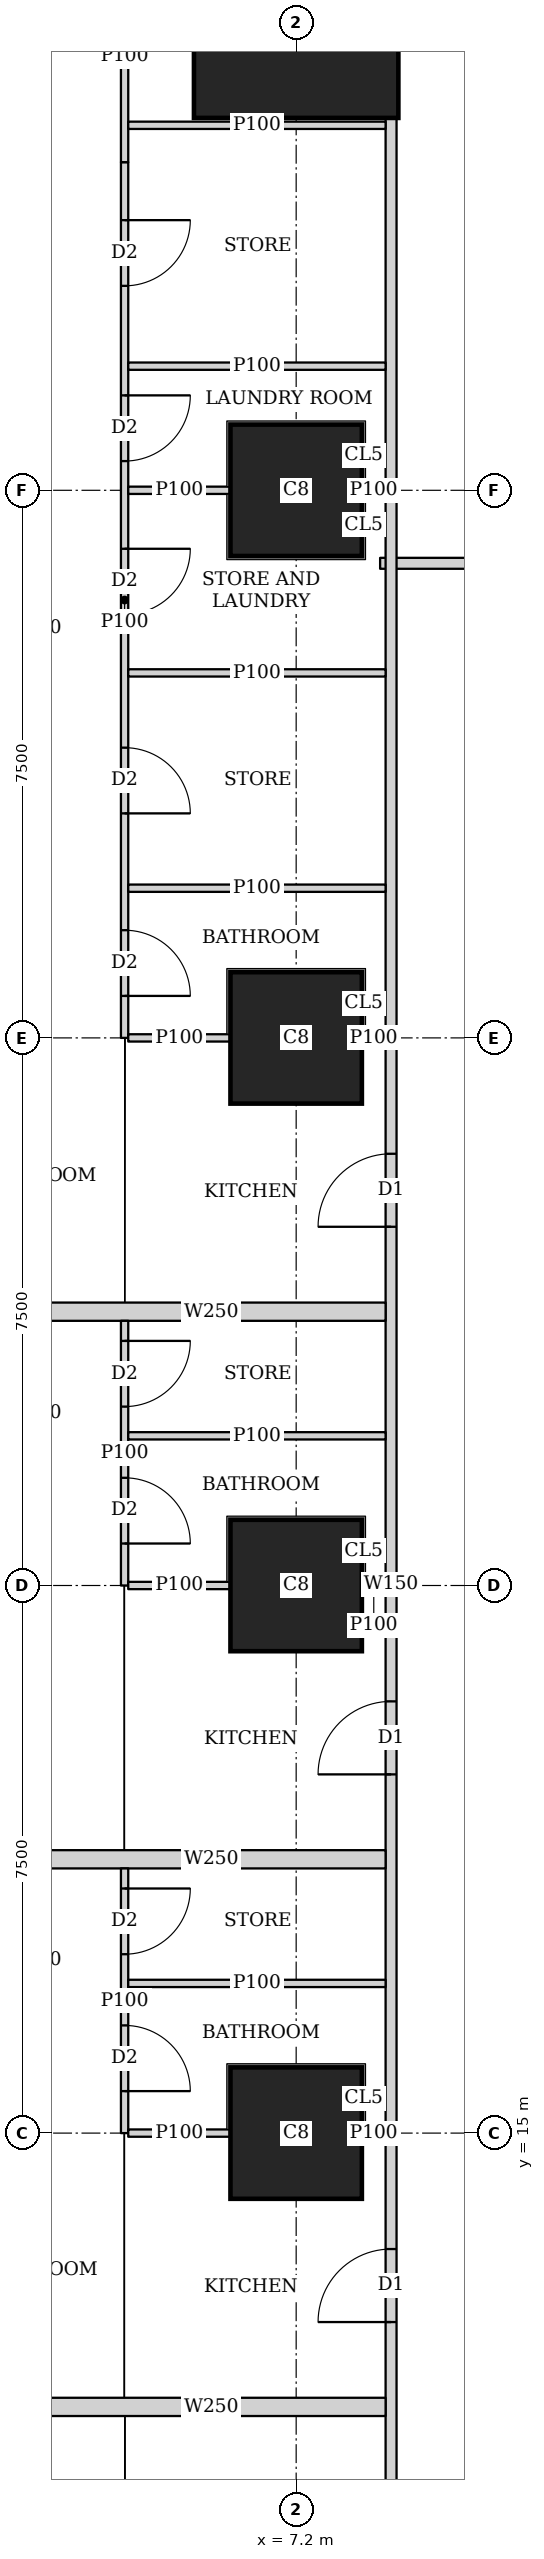
"""IFC4 building model, lengths in metres.
Left out: names, types, materials, properties, quantities, classifications, styles, units other than length and angle.
Written with IfcOpenShell. Run it as: python <this file> out.ifc"""

import sys

from ifc_helpers import new_model, si_unit, direction, frame, frame_2d, origin, origin_2d, place, context, subcontext, project, spatial, rectangle, extrude, element, fill, save


model = new_model("IFC4")
c1 = context("Model", 3, precision=1e-05, world=origin(), true_north=direction((0.0, 1.0)))
c2 = subcontext(c1, "Body", "Model", "MODEL_VIEW")
j1 = project(units=[si_unit("LENGTHUNIT", "METRE"), si_unit("PLANEANGLEUNIT", "RADIAN")], contexts=[c1])
p1 = place(None, origin())
s1 = spatial("IfcSite", under=j1, at=p1, CompositionType="ELEMENT")
p2 = place(p1, origin())
s2 = spatial("IfcBuilding", under=s1, at=p2, CompositionType="ELEMENT")
p3 = place(p2, frame((0.0, 0.0, 68.75)))
s3 = spatial("IfcBuildingStorey", under=s2, at=p3, CompositionType="ELEMENT", Elevation=68.75)
for number, where, z_axis, x_axis in (
    (1, (7.2, 15.0, 0.0), (0.0, 0.0, 1.0), (1.0, 0.0, 0.0)),
    (2, (7.2, 22.5, 0.0), (0.0, 0.0, 1.0), (1.0, 0.0, 0.0)),
    (3, (7.2, 30.0, 0.0), (0.0, 0.0, 1.0), (1.0, 0.0, 0.0)),
    (4, (7.2, 37.5, 0.0), (0.0, 0.0, 1.0), (1.0, 0.0, 0.0)),
):
    element("IfcColumn", number, at=place(p3, frame(where, z_axis=z_axis, x_axis=x_axis)), inside=s3, PredefinedType="COLUMN", context=c2, shape_type="SweptSolid", body=[
        extrude(rectangle(XDim=1.8, YDim=1.8, at=origin_2d()), origin(), (0.0, 0.0, 1.0), 3.75),
    ])
p4 = place(p3, frame((7.2, 44.0, 0.0), z_axis=(0.0, 0.0, 1.0), x_axis=(1.0, 0.0, 0.0)))
e5 = element("IfcColumn", 5, at=p4, inside=s3, PredefinedType="COLUMN", context=c2, shape_type="SweptSolid", body=[
    extrude(rectangle(XDim=2.8, YDim=2.8, at=origin_2d()), origin(), (0.0, 0.0, 1.0), 3.75),
])
p5 = place(p3, frame((8.5, 2.426, 0.0), z_axis=(0.0, 0.0, 1.0), x_axis=(0.0, 1.0, 0.0)))
e6 = element("IfcWall", 6, at=p5, inside=s3, PredefinedType="SOLIDWALL", context=c2, shape_type="SweptSolid", body=[
    extrude(rectangle(XDim=40.173, YDim=0.15, at=frame_2d((20.086, 0.0))), origin(), (0.0, 0.0, 1.0), 3.45),
])
p6 = place(p5, frame((6.661, 0.0, 0.0)))
e7 = element("IfcOpeningElement", 7, at=p6, cuts=e6, PredefinedType="OPENING", context=c2, shape_type="SweptSolid", body=[
    extrude(rectangle(XDim=1.0, YDim=2.1, at=frame_2d((0.5, 1.05))), frame((0.0, 0.085, 0.0), z_axis=(0.0, -1.0, 0.0), x_axis=(1.0, 0.0, 0.0)), (0.0, 0.0, 1.0), 0.17),
])
p7 = place(p5, frame((9.986, 0.0, 0.0)))
e8 = element("IfcOpeningElement", 8, at=p7, cuts=e6, PredefinedType="OPENING", context=c2, shape_type="SweptSolid", body=[
    extrude(rectangle(XDim=1.0, YDim=2.1, at=frame_2d((0.5, 1.05))), frame((0.0, 0.085, 0.0), z_axis=(0.0, -1.0, 0.0), x_axis=(1.0, 0.0, 0.0)), (0.0, 0.0, 1.0), 0.17),
])
p8 = place(p5, frame((17.487, 0.0, 0.0)))
e9 = element("IfcOpeningElement", 9, at=p8, cuts=e6, PredefinedType="OPENING", context=c2, shape_type="SweptSolid", body=[
    extrude(rectangle(XDim=1.0, YDim=2.1, at=frame_2d((0.5, 1.05))), frame((0.0, 0.085, 0.0), z_axis=(0.0, -1.0, 0.0), x_axis=(1.0, 0.0, 0.0)), (0.0, 0.0, 1.0), 0.17),
])
p9 = place(p5, frame((24.987, 0.0, 0.0)))
e10 = element("IfcOpeningElement", 10, at=p9, cuts=e6, PredefinedType="OPENING", context=c2, shape_type="SweptSolid", body=[
    extrude(rectangle(XDim=1.0, YDim=2.1, at=frame_2d((0.5, 1.05))), frame((0.0, 0.085, 0.0), z_axis=(0.0, -1.0, 0.0), x_axis=(1.0, 0.0, 0.0)), (0.0, 0.0, 1.0), 0.17),
])
p10 = place(p3, frame((8.35, 36.5, 0.0), z_axis=(0.0, 0.0, 1.0), x_axis=(1.0, 0.0, 0.0)))
e11 = element("IfcWall", 11, at=p10, inside=s3, PredefinedType="SOLIDWALL", context=c2, shape_type="SweptSolid", body=[
    extrude(rectangle(XDim=26.415, YDim=0.15, at=frame_2d((13.208, 0.0))), origin(), (0.0, 0.0, 1.0), 3.45),
])
p11 = place(p10, frame((2.6, 0.0, 0.0)))
e12 = element("IfcOpeningElement", 12, at=p11, cuts=e11, PredefinedType="OPENING", context=c2, shape_type="SweptSolid", body=[
    extrude(rectangle(XDim=1.0, YDim=2.1, at=frame_2d((0.5, 1.05))), frame((0.0, 0.085, 0.0), z_axis=(0.0, -1.0, 0.0), x_axis=(1.0, 0.0, 0.0)), (0.0, 0.0, 1.0), 0.17),
])
p12 = place(p10, frame((10.949, 0.0, 0.0)))
e13 = element("IfcOpeningElement", 13, at=p12, cuts=e11, PredefinedType="OPENING", context=c2, shape_type="SweptSolid", body=[
    extrude(rectangle(XDim=1.0, YDim=2.1, at=frame_2d((0.5, 1.05))), frame((0.0, 0.085, 0.0), z_axis=(0.0, -1.0, 0.0), x_axis=(1.0, 0.0, 0.0)), (0.0, 0.0, 1.0), 0.17),
])
p13 = place(p10, frame((18.149, 0.0, 0.0)))
e14 = element("IfcOpeningElement", 14, at=p13, cuts=e11, PredefinedType="OPENING", context=c2, shape_type="SweptSolid", body=[
    extrude(rectangle(XDim=1.0, YDim=2.1, at=frame_2d((0.5, 1.05))), frame((0.0, 0.085, 0.0), z_axis=(0.0, -1.0, 0.0), x_axis=(1.0, 0.0, 0.0)), (0.0, 0.0, 1.0), 0.17),
])
p14 = place(p3, frame((4.85, 15.0, 0.0), z_axis=(0.0, 0.0, 1.0), x_axis=(0.0, 1.0, 0.0)))
e15 = element("IfcWall", 15, at=p14, inside=s3, PredefinedType="PARTITIONING", context=c2, shape_type="SweptSolid", body=[
    extrude(rectangle(XDim=3.625, YDim=0.1, at=frame_2d((1.812, 0.0))), origin(), (0.0, 0.0, 1.0), 3.45),
])
p15 = place(p14, frame((0.575, 0.0, 0.0)))
e16 = element("IfcOpeningElement", 16, at=p15, cuts=e15, PredefinedType="OPENING", context=c2, shape_type="SweptSolid", body=[
    extrude(rectangle(XDim=0.9, YDim=2.1, at=frame_2d((0.45, 1.05))), frame((0.0, 0.06, 0.0), z_axis=(0.0, -1.0, 0.0), x_axis=(1.0, 0.0, 0.0)), (0.0, 0.0, 1.0), 0.12),
])
p16 = place(p14, frame((2.45, 0.0, 0.0)))
e17 = element("IfcOpeningElement", 17, at=p16, cuts=e15, PredefinedType="OPENING", context=c2, shape_type="SweptSolid", body=[
    extrude(rectangle(XDim=0.9, YDim=2.1, at=frame_2d((0.45, 1.05))), frame((0.0, 0.06, 0.0), z_axis=(0.0, -1.0, 0.0), x_axis=(1.0, 0.0, 0.0)), (0.0, 0.0, 1.0), 0.12),
])
p17 = place(p3, frame((4.9, 15.0, 0.0), z_axis=(0.0, 0.0, 1.0), x_axis=(1.0, 0.0, 0.0)))
e18 = element("IfcWall", 18, at=p17, inside=s3, PredefinedType="PARTITIONING", context=c2, shape_type="SweptSolid", body=[
    extrude(rectangle(XDim=1.399, YDim=0.1, at=frame_2d((0.7, 0.0))), origin(), (0.0, 0.0, 1.0), 3.45),
])
p18 = place(p3, frame((8.101, 15.0, 0.0), z_axis=(0.0, 0.0, 1.0), x_axis=(1.0, 0.0, 0.0)))
e19 = element("IfcWall", 19, at=p18, inside=s3, PredefinedType="PARTITIONING", context=c2, shape_type="SweptSolid", body=[
    extrude(rectangle(XDim=0.324, YDim=0.1, at=frame_2d((0.162, 0.0))), origin(), (0.0, 0.0, 1.0), 3.45),
])
p19 = place(p3, frame((4.9, 17.05, 0.0), z_axis=(0.0, 0.0, 1.0), x_axis=(1.0, 0.0, 0.0)))
e20 = element("IfcWall", 20, at=p19, inside=s3, PredefinedType="PARTITIONING", context=c2, shape_type="SweptSolid", body=[
    extrude(rectangle(XDim=3.525, YDim=0.1, at=frame_2d((1.763, 0.0))), origin(), (0.0, 0.0, 1.0), 3.45),
])
p20 = place(p3, frame((3.65, 11.25, 0.0), z_axis=(0.0, 0.0, 1.0), x_axis=(1.0, 0.0, 0.0)))
e21 = element("IfcWall", 21, at=p20, inside=s3, PredefinedType="SOLIDWALL", context=c2, shape_type="SweptSolid", body=[
    extrude(rectangle(XDim=4.775, YDim=0.25, at=frame_2d((2.388, 0.0))), origin(), (0.0, 0.0, 1.0), 3.45),
])
p21 = place(p3, frame((4.85, 22.5, 0.0), z_axis=(0.0, 0.0, 1.0), x_axis=(0.0, 1.0, 0.0)))
e22 = element("IfcWall", 22, at=p21, inside=s3, PredefinedType="PARTITIONING", context=c2, shape_type="SweptSolid", body=[
    extrude(rectangle(XDim=3.625, YDim=0.1, at=frame_2d((1.812, 0.0))), origin(), (0.0, 0.0, 1.0), 3.45),
])
p22 = place(p21, frame((0.575, 0.0, 0.0)))
e23 = element("IfcOpeningElement", 23, at=p22, cuts=e22, PredefinedType="OPENING", context=c2, shape_type="SweptSolid", body=[
    extrude(rectangle(XDim=0.9, YDim=2.1, at=frame_2d((0.45, 1.05))), frame((0.0, 0.06, 0.0), z_axis=(0.0, -1.0, 0.0), x_axis=(1.0, 0.0, 0.0)), (0.0, 0.0, 1.0), 0.12),
])
p23 = place(p21, frame((2.45, 0.0, 0.0)))
e24 = element("IfcOpeningElement", 24, at=p23, cuts=e22, PredefinedType="OPENING", context=c2, shape_type="SweptSolid", body=[
    extrude(rectangle(XDim=0.9, YDim=2.1, at=frame_2d((0.45, 1.05))), frame((0.0, 0.06, 0.0), z_axis=(0.0, -1.0, 0.0), x_axis=(1.0, 0.0, 0.0)), (0.0, 0.0, 1.0), 0.12),
])
p24 = place(p3, frame((4.9, 22.5, 0.0), z_axis=(0.0, 0.0, 1.0), x_axis=(1.0, 0.0, 0.0)))
e25 = element("IfcWall", 25, at=p24, inside=s3, PredefinedType="PARTITIONING", context=c2, shape_type="SweptSolid", body=[
    extrude(rectangle(XDim=1.399, YDim=0.1, at=frame_2d((0.7, 0.0))), origin(), (0.0, 0.0, 1.0), 3.45),
])
p25 = place(p3, frame((8.101, 22.5, 0.0), z_axis=(0.0, 0.0, 1.0), x_axis=(1.0, 0.0, 0.0)))
e26 = element("IfcWall", 26, at=p25, inside=s3, PredefinedType="PARTITIONING", context=c2, shape_type="SweptSolid", body=[
    extrude(rectangle(XDim=0.324, YDim=0.1, at=frame_2d((0.162, 0.0))), origin(), (0.0, 0.0, 1.0), 3.45),
])
p26 = place(p3, frame((4.9, 24.55, 0.0), z_axis=(0.0, 0.0, 1.0), x_axis=(1.0, 0.0, 0.0)))
e27 = element("IfcWall", 27, at=p26, inside=s3, PredefinedType="PARTITIONING", context=c2, shape_type="SweptSolid", body=[
    extrude(rectangle(XDim=3.525, YDim=0.1, at=frame_2d((1.763, 0.0))), origin(), (0.0, 0.0, 1.0), 3.45),
])
p27 = place(p3, frame((3.65, 18.75, 0.0), z_axis=(0.0, 0.0, 1.0), x_axis=(1.0, 0.0, 0.0)))
e28 = element("IfcWall", 28, at=p27, inside=s3, PredefinedType="SOLIDWALL", context=c2, shape_type="SweptSolid", body=[
    extrude(rectangle(XDim=4.775, YDim=0.25, at=frame_2d((2.388, 0.0))), origin(), (0.0, 0.0, 1.0), 3.45),
])
p28 = place(p3, frame((4.85, 30.0, 0.0), z_axis=(0.0, 0.0, 1.0), x_axis=(0.0, 1.0, 0.0)))
e29 = element("IfcWall", 29, at=p28, inside=s3, PredefinedType="PARTITIONING", context=c2, shape_type="SweptSolid", body=[
    extrude(rectangle(XDim=11.994, YDim=0.1, at=frame_2d((5.997, 0.0))), origin(), (0.0, 0.0, 1.0), 3.45),
])
p29 = place(p28, frame((0.575, 0.0, 0.0)))
e30 = element("IfcOpeningElement", 30, at=p29, cuts=e29, PredefinedType="OPENING", context=c2, shape_type="SweptSolid", body=[
    extrude(rectangle(XDim=0.9, YDim=2.1, at=frame_2d((0.45, 1.05))), frame((0.0, 0.06, 0.0), z_axis=(0.0, -1.0, 0.0), x_axis=(1.0, 0.0, 0.0)), (0.0, 0.0, 1.0), 0.12),
])
p30 = place(p28, frame((5.799, 0.0, 0.0)))
e31 = element("IfcOpeningElement", 31, at=p30, cuts=e29, PredefinedType="OPENING", context=c2, shape_type="SweptSolid", body=[
    extrude(rectangle(XDim=0.9, YDim=2.1, at=frame_2d((0.45, 1.05))), frame((0.0, 0.06, 0.0), z_axis=(0.0, -1.0, 0.0), x_axis=(1.0, 0.0, 0.0)), (0.0, 0.0, 1.0), 0.12),
])
p31 = place(p28, frame((7.9, 0.0, 0.0)))
e32 = element("IfcOpeningElement", 32, at=p31, cuts=e29, PredefinedType="OPENING", context=c2, shape_type="SweptSolid", body=[
    extrude(rectangle(XDim=0.9, YDim=2.1, at=frame_2d((0.45, 1.05))), frame((0.0, 0.06, 0.0), z_axis=(0.0, -1.0, 0.0), x_axis=(1.0, 0.0, 0.0)), (0.0, 0.0, 1.0), 0.12),
])
p32 = place(p28, frame((3.075, 0.0, 0.0)))
e33 = element("IfcOpeningElement", 33, at=p32, cuts=e29, PredefinedType="OPENING", context=c2, shape_type="SweptSolid", body=[
    extrude(rectangle(XDim=0.9, YDim=2.1, at=frame_2d((0.45, 1.05))), frame((0.0, 0.06, 0.0), z_axis=(0.0, -1.0, 0.0), x_axis=(1.0, 0.0, 0.0)), (0.0, 0.0, 1.0), 0.12),
])
p33 = place(p28, frame((10.3, 0.0, 0.0)))
e34 = element("IfcOpeningElement", 34, at=p33, cuts=e29, PredefinedType="OPENING", context=c2, shape_type="SweptSolid", body=[
    extrude(rectangle(XDim=0.9, YDim=2.1, at=frame_2d((0.45, 1.05))), frame((0.0, 0.06, 0.0), z_axis=(0.0, -1.0, 0.0), x_axis=(1.0, 0.0, 0.0)), (0.0, 0.0, 1.0), 0.12),
])
p34 = place(p3, frame((4.85, 41.994, 0.0), z_axis=(0.0, 0.0, 1.0), x_axis=(0.0, 1.0, 0.0)))
e35 = element("IfcWall", 35, at=p34, inside=s3, PredefinedType="PARTITIONING", context=c2, shape_type="SweptSolid", body=[
    extrude(rectangle(XDim=2.901, YDim=0.1, at=frame_2d((1.451, 0.0))), origin(), (0.0, 0.0, 1.0), 2.0),
])
p35 = place(p3, frame((4.9, 30.0, 0.0), z_axis=(0.0, 0.0, 1.0), x_axis=(1.0, 0.0, 0.0)))
e36 = element("IfcWall", 36, at=p35, inside=s3, PredefinedType="PARTITIONING", context=c2, shape_type="SweptSolid", body=[
    extrude(rectangle(XDim=1.399, YDim=0.1, at=frame_2d((0.7, 0.0))), origin(), (0.0, 0.0, 1.0), 3.45),
])
p36 = place(p3, frame((8.101, 30.0, 0.0), z_axis=(0.0, 0.0, 1.0), x_axis=(1.0, 0.0, 0.0)))
e37 = element("IfcWall", 37, at=p36, inside=s3, PredefinedType="PARTITIONING", context=c2, shape_type="SweptSolid", body=[
    extrude(rectangle(XDim=0.324, YDim=0.1, at=frame_2d((0.162, 0.0))), origin(), (0.0, 0.0, 1.0), 3.45),
])
p37 = place(p3, frame((4.9, 34.999, 0.0), z_axis=(0.0, 0.0, 1.0), x_axis=(1.0, 0.0, 0.0)))
e38 = element("IfcWall", 38, at=p37, inside=s3, PredefinedType="PARTITIONING", context=c2, shape_type="SweptSolid", body=[
    extrude(rectangle(XDim=3.525, YDim=0.1, at=frame_2d((1.763, 0.0))), origin(), (0.0, 0.0, 1.0), 3.45),
])
p38 = place(p3, frame((4.9, 37.5, 0.0), z_axis=(0.0, 0.0, 1.0), x_axis=(1.0, 0.0, 0.0)))
e39 = element("IfcWall", 39, at=p38, inside=s3, PredefinedType="PARTITIONING", context=c2, shape_type="SweptSolid", body=[
    extrude(rectangle(XDim=1.399, YDim=0.1, at=frame_2d((0.7, 0.0))), origin(), (0.0, 0.0, 1.0), 3.45),
])
p39 = place(p3, frame((8.101, 37.5, 0.0), z_axis=(0.0, 0.0, 1.0), x_axis=(1.0, 0.0, 0.0)))
e40 = element("IfcWall", 40, at=p39, inside=s3, PredefinedType="PARTITIONING", context=c2, shape_type="SweptSolid", body=[
    extrude(rectangle(XDim=0.324, YDim=0.1, at=frame_2d((0.162, 0.0))), origin(), (0.0, 0.0, 1.0), 3.45),
])
p40 = place(p3, frame((4.9, 42.499, 0.0), z_axis=(0.0, 0.0, 1.0), x_axis=(1.0, 0.0, 0.0)))
e41 = element("IfcWall", 41, at=p40, inside=s3, PredefinedType="PARTITIONING", context=c2, shape_type="SweptSolid", body=[
    extrude(rectangle(XDim=3.525, YDim=0.1, at=frame_2d((1.763, 0.0))), origin(), (0.0, 0.0, 1.0), 2.0),
])
for number, where, z_axis, x_axis in (
    (42, (4.9, 32.05, 0.0), (0.0, 0.0, 1.0), (1.0, 0.0, 0.0)),
    (43, (4.9, 39.2, 0.0), (0.0, 0.0, 1.0), (1.0, 0.0, 0.0)),
):
    element("IfcWall", number, at=place(p3, frame(where, z_axis=z_axis, x_axis=x_axis)), inside=s3, PredefinedType="PARTITIONING", context=c2, shape_type="SweptSolid", body=[
        extrude(rectangle(XDim=3.525, YDim=0.1, at=frame_2d((1.763, 0.0))), origin(), (0.0, 0.0, 1.0), 3.45),
    ])
p41 = place(p3, frame((3.65, 26.25, 0.0), z_axis=(0.0, 0.0, 1.0), x_axis=(1.0, 0.0, 0.0)))
e44 = element("IfcWall", 44, at=p41, inside=s3, PredefinedType="SOLIDWALL", context=c2, shape_type="SweptSolid", body=[
    extrude(rectangle(XDim=4.775, YDim=0.25, at=frame_2d((2.388, 0.0))), origin(), (0.0, 0.0, 1.0), 3.45),
])
p42 = place(p15, origin())
e45 = element("IfcDoor", 45, at=p42, inside=s3, OperationType="SINGLE_SWING_RIGHT", PredefinedType="DOOR", context=c2, shape_type="SweptSolid", body=[
    extrude(rectangle(XDim=0.9, YDim=2.1, at=frame_2d((0.45, 1.05))), frame((0.0, 0.025, 0.0), z_axis=(0.0, -1.0, 0.0), x_axis=(1.0, 0.0, 0.0)), (0.0, 0.0, 1.0), 0.05),
])
fill(e16, e45)
p43 = place(p16, origin())
e46 = element("IfcDoor", 46, at=p43, inside=s3, OperationType="SINGLE_SWING_LEFT", PredefinedType="DOOR", context=c2, shape_type="SweptSolid", body=[
    extrude(rectangle(XDim=0.9, YDim=2.1, at=frame_2d((0.45, 1.05))), frame((0.0, 0.025, 0.0), z_axis=(0.0, -1.0, 0.0), x_axis=(1.0, 0.0, 0.0)), (0.0, 0.0, 1.0), 0.05),
])
fill(e17, e46)
p44 = place(p7, origin())
e47 = element("IfcDoor", 47, at=p44, inside=s3, OperationType="SINGLE_SWING_LEFT", PredefinedType="DOOR", context=c2, shape_type="SweptSolid", body=[
    extrude(rectangle(XDim=1.0, YDim=2.1, at=frame_2d((0.5, 1.05))), frame((0.0, 0.025, 0.0), z_axis=(0.0, -1.0, 0.0), x_axis=(1.0, 0.0, 0.0)), (0.0, 0.0, 1.0), 0.05),
])
fill(e8, e47)
p45 = place(p22, origin())
e48 = element("IfcDoor", 48, at=p45, inside=s3, OperationType="SINGLE_SWING_RIGHT", PredefinedType="DOOR", context=c2, shape_type="SweptSolid", body=[
    extrude(rectangle(XDim=0.9, YDim=2.1, at=frame_2d((0.45, 1.05))), frame((0.0, 0.025, 0.0), z_axis=(0.0, -1.0, 0.0), x_axis=(1.0, 0.0, 0.0)), (0.0, 0.0, 1.0), 0.05),
])
fill(e23, e48)
p46 = place(p23, origin())
e49 = element("IfcDoor", 49, at=p46, inside=s3, OperationType="SINGLE_SWING_LEFT", PredefinedType="DOOR", context=c2, shape_type="SweptSolid", body=[
    extrude(rectangle(XDim=0.9, YDim=2.1, at=frame_2d((0.45, 1.05))), frame((0.0, 0.025, 0.0), z_axis=(0.0, -1.0, 0.0), x_axis=(1.0, 0.0, 0.0)), (0.0, 0.0, 1.0), 0.05),
])
fill(e24, e49)
p47 = place(p8, origin())
e50 = element("IfcDoor", 50, at=p47, inside=s3, OperationType="SINGLE_SWING_LEFT", PredefinedType="DOOR", context=c2, shape_type="SweptSolid", body=[
    extrude(rectangle(XDim=1.0, YDim=2.1, at=frame_2d((0.5, 1.05))), frame((0.0, 0.025, 0.0), z_axis=(0.0, -1.0, 0.0), x_axis=(1.0, 0.0, 0.0)), (0.0, 0.0, 1.0), 0.05),
])
fill(e9, e50)
p48 = place(p29, origin())
e51 = element("IfcDoor", 51, at=p48, inside=s3, OperationType="SINGLE_SWING_RIGHT", PredefinedType="DOOR", context=c2, shape_type="SweptSolid", body=[
    extrude(rectangle(XDim=0.9, YDim=2.1, at=frame_2d((0.45, 1.05))), frame((0.0, 0.025, 0.0), z_axis=(0.0, -1.0, 0.0), x_axis=(1.0, 0.0, 0.0)), (0.0, 0.0, 1.0), 0.05),
])
fill(e30, e51)
p49 = place(p30, origin())
e52 = element("IfcDoor", 52, at=p49, inside=s3, OperationType="SINGLE_SWING_LEFT", PredefinedType="DOOR", context=c2, shape_type="SweptSolid", body=[
    extrude(rectangle(XDim=0.9, YDim=2.1, at=frame_2d((0.45, 1.05))), frame((0.0, 0.025, 0.0), z_axis=(0.0, -1.0, 0.0), x_axis=(1.0, 0.0, 0.0)), (0.0, 0.0, 1.0), 0.05),
])
fill(e31, e52)
p50 = place(p31, origin())
e53 = element("IfcDoor", 53, at=p50, inside=s3, OperationType="SINGLE_SWING_LEFT", PredefinedType="DOOR", context=c2, shape_type="SweptSolid", body=[
    extrude(rectangle(XDim=0.9, YDim=2.1, at=frame_2d((0.45, 1.05))), frame((0.0, 0.025, 0.0), z_axis=(0.0, -1.0, 0.0), x_axis=(1.0, 0.0, 0.0)), (0.0, 0.0, 1.0), 0.05),
])
fill(e32, e53)
p51 = place(p32, origin())
e54 = element("IfcDoor", 54, at=p51, inside=s3, OperationType="SINGLE_SWING_RIGHT", PredefinedType="DOOR", context=c2, shape_type="SweptSolid", body=[
    extrude(rectangle(XDim=0.9, YDim=2.1, at=frame_2d((0.45, 1.05))), frame((0.0, 0.025, 0.0), z_axis=(0.0, -1.0, 0.0), x_axis=(1.0, 0.0, 0.0)), (0.0, 0.0, 1.0), 0.05),
])
fill(e33, e54)
p52 = place(p33, origin())
e55 = element("IfcDoor", 55, at=p52, inside=s3, OperationType="SINGLE_SWING_LEFT", PredefinedType="DOOR", context=c2, shape_type="SweptSolid", body=[
    extrude(rectangle(XDim=0.9, YDim=2.1, at=frame_2d((0.45, 1.05))), frame((0.0, 0.025, 0.0), z_axis=(0.0, -1.0, 0.0), x_axis=(1.0, 0.0, 0.0)), (0.0, 0.0, 1.0), 0.05),
])
fill(e34, e55)
p53 = place(p9, origin())
e56 = element("IfcDoor", 56, at=p53, inside=s3, OperationType="SINGLE_SWING_LEFT", PredefinedType="DOOR", context=c2, shape_type="SweptSolid", body=[
    extrude(rectangle(XDim=1.0, YDim=2.1, at=frame_2d((0.5, 1.05))), frame((0.0, 0.025, 0.0), z_axis=(0.0, -1.0, 0.0), x_axis=(1.0, 0.0, 0.0)), (0.0, 0.0, 1.0), 0.05),
])
fill(e10, e56)
save(model, sys.argv[1])
